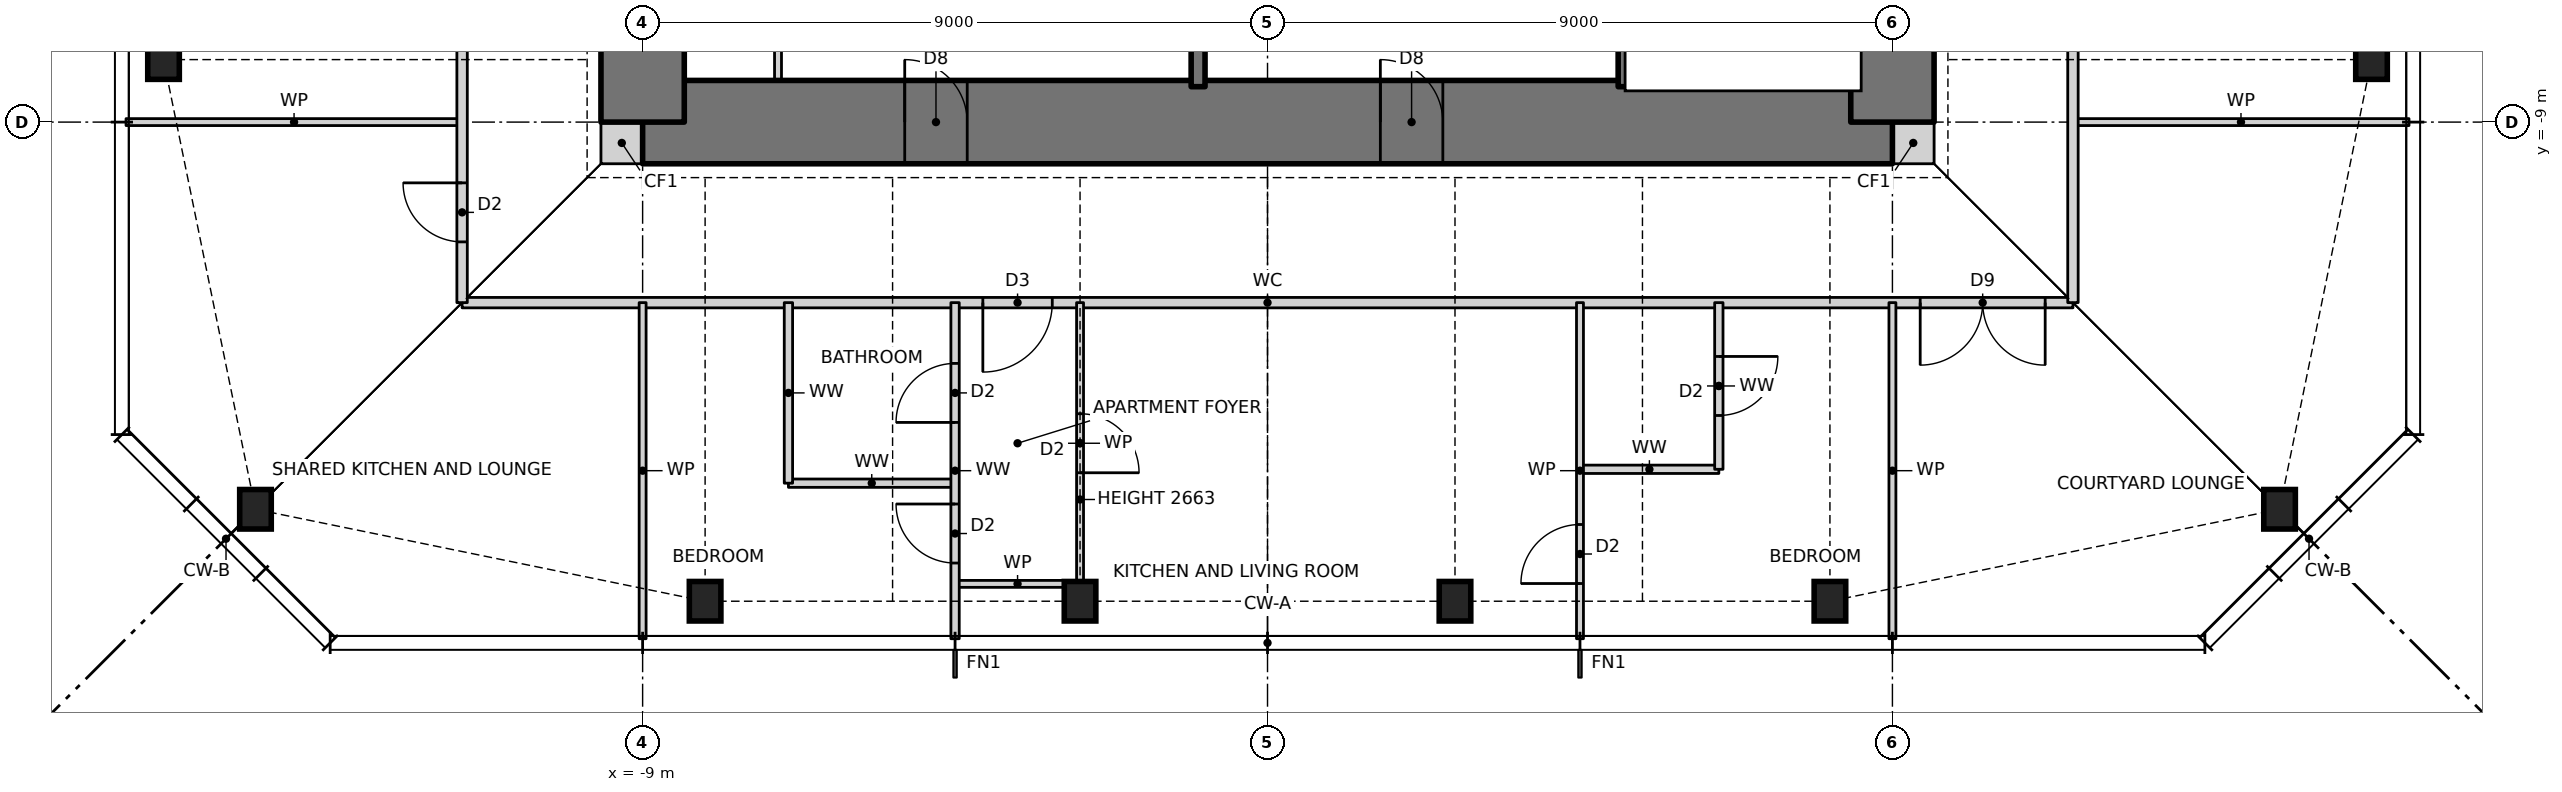
"""IFC4 building model, lengths in metres.
Left out: names, types, materials, properties, quantities, classifications, styles, units other than length and angle.
Written with IfcOpenShell. Run it as: python <this file> out.ifc"""

import sys

from ifc_helpers import new_model, si_unit, direction, frame, frame_2d, origin, origin_2d, place, context, subcontext, project, spatial, rectangle, i_section, extrude, element, fill, save


model = new_model("IFC4")
c1 = context("Model", 3, precision=1e-05, world=origin(), true_north=direction((0.0, 1.0)))
c2 = subcontext(c1, "Body", "Model", "MODEL_VIEW")
j1 = project(units=[si_unit("LENGTHUNIT", "METRE"), si_unit("PLANEANGLEUNIT", "RADIAN")], contexts=[c1])
p1 = place(None, origin())
s1 = spatial("IfcSite", under=j1, at=p1, CompositionType="ELEMENT")
p2 = place(p1, origin())
s2 = spatial("IfcBuilding", under=s1, at=p2, CompositionType="ELEMENT")
p3 = place(p2, frame((0.0, 0.0, 239.5)))
s3 = spatial("IfcBuildingStorey", under=s2, at=p3, CompositionType="ELEMENT", Elevation=239.5)
for number, where, z_axis, x_axis in (
    (1, (-14.576, -14.576, 0.0), (0.0, 0.0, 1.0), (1.0, 0.0, 0.0)),
    (2, (-8.1, -15.9, 0.0), (0.0, 0.0, 1.0), (1.0, 0.0, 0.0)),
    (3, (-2.7, -15.9, 0.0), (0.0, 0.0, 1.0), (1.0, 0.0, 0.0)),
    (4, (2.7, -15.9, 0.0), (0.0, 0.0, 1.0), (1.0, 0.0, 0.0)),
    (5, (8.1, -15.9, 0.0), (0.0, 0.0, 1.0), (1.0, 0.0, 0.0)),
    (6, (14.576, -14.576, 0.0), (0.0, 0.0, 1.0), (1.0, 0.0, 0.0)),
    (7, (15.9, -8.1, 0.0), (0.0, 0.0, 1.0), (1.0, 0.0, 0.0)),
    (8, (-15.9, -8.1, 0.0), (0.0, 0.0, 1.0), (1.0, 0.0, 0.0)),
):
    element("IfcColumn", number, at=place(p3, frame(where, z_axis=z_axis, x_axis=x_axis)), inside=s3, PredefinedType="COLUMN", context=c2, shape_type="SweptSolid", body=[
        extrude(i_section(OverallWidth=0.455, OverallDepth=0.569, WebThickness=0.078, FlangeThickness=0.125, at=origin_2d()), origin(), (0.0, 0.0, 1.0), 3.5),
    ])
for number, where, z_axis, x_axis in (
    (9, (-9.6, -9.3, 0.0), (0.0, 0.0, 1.0), (1.0, 0.0, 0.0)),
    (10, (9.0, -9.3, 0.0), (0.0, 0.0, 1.0), (1.0, 0.0, 0.0)),
):
    element("IfcWall", number, at=place(p3, frame(where, z_axis=z_axis, x_axis=x_axis)), inside=s3, PredefinedType="SOLIDWALL", context=c2, shape_type="SweptSolid", body=[
        extrude(rectangle(XDim=0.6, YDim=0.6, at=frame_2d((0.3, 0.0))), origin(), (0.0, 0.0, 1.0), 3.5),
    ])
p4 = place(p3, frame((-9.0, -9.0, 0.0), z_axis=(0.0, 0.0, 1.0), x_axis=(1.0, 0.0, 0.0)))
e11 = element("IfcWall", 11, at=p4, inside=s3, PredefinedType="SHEAR", context=c2, shape_type="SweptSolid", body=[
    extrude(rectangle(XDim=18.0, YDim=1.2, at=frame_2d((9.0, 0.0))), origin(), (0.0, 0.0, 1.0), 3.5),
])
p5 = place(p4, frame((3.775, 0.0, 0.0)))
e12 = element("IfcOpeningElement", 12, at=p5, cuts=e11, PredefinedType="OPENING", context=c2, shape_type="SweptSolid", body=[
    extrude(rectangle(XDim=0.9, YDim=2.1, at=frame_2d((0.45, 1.05))), frame((0.0, 0.61, 0.0), z_axis=(0.0, -1.0, 0.0), x_axis=(1.0, 0.0, 0.0)), (0.0, 0.0, 1.0), 1.22),
])
p6 = place(p4, frame((10.625, 0.0, 0.0)))
e13 = element("IfcOpeningElement", 13, at=p6, cuts=e11, PredefinedType="OPENING", context=c2, shape_type="SweptSolid", body=[
    extrude(rectangle(XDim=0.9, YDim=2.1, at=frame_2d((0.45, 1.05))), frame((0.0, 0.61, 0.0), z_axis=(0.0, -1.0, 0.0), x_axis=(1.0, 0.0, 0.0)), (0.0, 0.0, 1.0), 1.22),
])
p7 = place(p3, frame((9.0, -9.0, 0.0), z_axis=(0.0, 0.0, 1.0), x_axis=(0.0, 1.0, 0.0)))
e14 = element("IfcWall", 14, at=p7, inside=s3, PredefinedType="SHEAR", context=c2, shape_type="SweptSolid", body=[
    extrude(rectangle(XDim=18.0, YDim=1.2, at=frame_2d((9.0, 0.0))), origin(), (0.0, 0.0, 1.0), 3.5),
])
p8 = place(p7, frame((8.5, 0.0, 0.0)))
e15 = element("IfcOpeningElement", 15, at=p8, cuts=e14, PredefinedType="OPENING", context=c2, shape_type="SweptSolid", body=[
    extrude(rectangle(XDim=1.0, YDim=2.1, at=frame_2d((0.5, 1.05))), frame((0.0, 0.61, 0.0), z_axis=(0.0, -1.0, 0.0), x_axis=(1.0, 0.0, 0.0)), (0.0, 0.0, 1.0), 1.22),
])
p9 = place(p3, frame((-9.0, 9.0, 0.0), z_axis=(0.0, 0.0, 1.0), x_axis=(0.0, -1.0, 0.0)))
e16 = element("IfcWall", 16, at=p9, inside=s3, PredefinedType="SHEAR", context=c2, shape_type="SweptSolid", body=[
    extrude(rectangle(XDim=18.0, YDim=1.2, at=frame_2d((9.0, 0.0))), origin(), (0.0, 0.0, 1.0), 3.5),
])
p10 = place(p9, frame((8.5, 0.0, 0.0)))
e17 = element("IfcOpeningElement", 17, at=p10, cuts=e16, PredefinedType="OPENING", context=c2, shape_type="SweptSolid", body=[
    extrude(rectangle(XDim=1.0, YDim=2.1, at=frame_2d((0.5, 1.05))), frame((0.0, 0.61, 0.0), z_axis=(0.0, -1.0, 0.0), x_axis=(1.0, 0.0, 0.0)), (0.0, 0.0, 1.0), 1.22),
])
p11 = place(p3, frame((-4.5, -15.65, 0.0), z_axis=(0.0, 0.0, 1.0), x_axis=(1.0, 0.0, 0.0)))
e18 = element("IfcWall", 18, at=p11, inside=s3, PredefinedType="PARTITIONING", context=c2, shape_type="SweptSolid", body=[
    extrude(rectangle(XDim=1.8, YDim=0.1, at=frame_2d((0.9, 0.0))), origin(), (0.0, 0.0, 1.0), 3.27),
])
p12 = place(p3, frame((-6.9, -14.2, 0.0), z_axis=(0.0, 0.0, 1.0), x_axis=(1.0, 0.0, 0.0)))
e19 = element("IfcWall", 19, at=p12, inside=s3, PredefinedType="PARTITIONING", context=c2, shape_type="SweptSolid", body=[
    extrude(rectangle(XDim=2.4, YDim=0.12, at=frame_2d((1.2, 0.0))), origin(), (0.0, 0.0, 1.0), 3.27),
])
p13 = place(p3, frame((4.5, -14.0, 0.0), z_axis=(0.0, 0.0, 1.0), x_axis=(1.0, 0.0, 0.0)))
e20 = element("IfcWall", 20, at=p13, inside=s3, PredefinedType="PARTITIONING", context=c2, shape_type="SweptSolid", body=[
    extrude(rectangle(XDim=2.0, YDim=0.12, at=frame_2d((1.0, 0.0))), origin(), (0.0, 0.0, 1.0), 3.27),
])
p14 = place(p3, frame((-11.6, -11.6, 0.0), z_axis=(0.0, 0.0, 1.0), x_axis=(1.0, 0.0, 0.0)))
e21 = element("IfcWall", 21, at=p14, inside=s3, PredefinedType="PARTITIONING", context=c2, shape_type="SweptSolid", body=[
    extrude(rectangle(XDim=23.2, YDim=0.15, at=frame_2d((11.6, 0.0))), origin(), (0.0, 0.0, 1.0), 3.27),
])
p15 = place(p14, frame((7.5, 0.0, 0.0)))
e22 = element("IfcOpeningElement", 22, at=p15, cuts=e21, PredefinedType="OPENING", context=c2, shape_type="SweptSolid", body=[
    extrude(rectangle(XDim=1.0, YDim=2.1, at=frame_2d((0.5, 1.05))), frame((0.0, 0.085, 0.0), z_axis=(0.0, -1.0, 0.0), x_axis=(1.0, 0.0, 0.0)), (0.0, 0.0, 1.0), 0.17),
])
p16 = place(p14, frame((21.0, 0.0, 0.0)))
e23 = element("IfcOpeningElement", 23, at=p16, cuts=e21, PredefinedType="OPENING", context=c2, shape_type="SweptSolid", body=[
    extrude(rectangle(XDim=1.8, YDim=2.1, at=frame_2d((0.9, 1.05))), frame((0.0, 0.085, 0.0), z_axis=(0.0, -1.0, 0.0), x_axis=(1.0, 0.0, 0.0)), (0.0, 0.0, 1.0), 0.17),
])
for number, where, z_axis, x_axis in (
    (24, (-16.44, -9.0, 0.0), (0.0, 0.0, 1.0), (1.0, 0.0, 0.0)),
    (25, (11.6, -9.0, 0.0), (0.0, 0.0, 1.0), (1.0, 0.0, 0.0)),
):
    element("IfcWall", number, at=place(p3, frame(where, z_axis=z_axis, x_axis=x_axis)), inside=s3, PredefinedType="PARTITIONING", context=c2, shape_type="SweptSolid", body=[
        extrude(rectangle(XDim=4.84, YDim=0.1, at=frame_2d((2.42, 0.0))), origin(), (0.0, 0.0, 1.0), 3.27),
    ])
p17 = place(p3, frame((11.6, -11.6, 0.0), z_axis=(0.0, 0.0, 1.0), x_axis=(0.0, 1.0, 0.0)))
e26 = element("IfcWall", 26, at=p17, inside=s3, PredefinedType="PARTITIONING", context=c2, shape_type="SweptSolid", body=[
    extrude(rectangle(XDim=23.2, YDim=0.15, at=frame_2d((11.6, 0.0))), origin(), (0.0, 0.0, 1.0), 3.27),
])
p18 = place(p17, frame((7.5, 0.0, 0.0)))
e27 = element("IfcOpeningElement", 27, at=p18, cuts=e26, PredefinedType="OPENING", context=c2, shape_type="SweptSolid", body=[
    extrude(rectangle(XDim=1.0, YDim=2.1, at=frame_2d((0.5, 1.05))), frame((0.0, 0.085, 0.0), z_axis=(0.0, -1.0, 0.0), x_axis=(1.0, 0.0, 0.0)), (0.0, 0.0, 1.0), 0.17),
])
p19 = place(p17, frame((21.0, 0.0, 0.0)))
e28 = element("IfcOpeningElement", 28, at=p19, cuts=e26, PredefinedType="OPENING", context=c2, shape_type="SweptSolid", body=[
    extrude(rectangle(XDim=1.8, YDim=2.1, at=frame_2d((0.9, 1.05))), frame((0.0, 0.085, 0.0), z_axis=(0.0, -1.0, 0.0), x_axis=(1.0, 0.0, 0.0)), (0.0, 0.0, 1.0), 0.17),
])
p20 = place(p3, frame((9.0, -16.44, 0.0), z_axis=(0.0, 0.0, 1.0), x_axis=(0.0, 1.0, 0.0)))
e29 = element("IfcWall", 29, at=p20, inside=s3, PredefinedType="PARTITIONING", context=c2, shape_type="SweptSolid", body=[
    extrude(rectangle(XDim=4.84, YDim=0.1, at=frame_2d((2.42, 0.0))), origin(), (0.0, 0.0, 1.0), 3.27),
])
p21 = place(p3, frame((6.5, -14.0, 0.0), z_axis=(0.0, 0.0, 1.0), x_axis=(0.0, 1.0, 0.0)))
e30 = element("IfcWall", 30, at=p21, inside=s3, PredefinedType="PARTITIONING", context=c2, shape_type="SweptSolid", body=[
    extrude(rectangle(XDim=2.4, YDim=0.12, at=frame_2d((1.2, 0.0))), origin(), (0.0, 0.0, 1.0), 3.27),
])
p22 = place(p21, frame((0.775, 0.0, 0.0)))
e31 = element("IfcOpeningElement", 31, at=p22, cuts=e30, PredefinedType="OPENING", context=c2, shape_type="SweptSolid", body=[
    extrude(rectangle(XDim=0.85, YDim=2.1, at=frame_2d((0.425, 1.05))), frame((0.0, 0.07, 0.0), z_axis=(0.0, -1.0, 0.0), x_axis=(1.0, 0.0, 0.0)), (0.0, 0.0, 1.0), 0.14),
])
p23 = place(p3, frame((5.15, -8.49, 0.0), z_axis=(0.0, 0.0, 1.0), x_axis=(0.0, 1.0, 0.0)))
e32 = element("IfcWall", 32, at=p23, inside=s3, PredefinedType="SOLIDWALL", context=c2, shape_type="SweptSolid", body=[
    extrude(rectangle(XDim=13.09, YDim=0.2, at=frame_2d((6.545, 0.0))), origin(), (0.0, 0.0, 1.0), 3.5),
])
p24 = place(p23, frame((7.89, 0.0, 0.0)))
e33 = element("IfcOpeningElement", 33, at=p24, cuts=e32, PredefinedType="OPENING", context=c2, shape_type="SweptSolid", body=[
    extrude(rectangle(XDim=1.2, YDim=2.1, at=frame_2d((0.6, 1.05))), frame((0.0, 0.11, 0.0), z_axis=(0.0, -1.0, 0.0), x_axis=(1.0, 0.0, 0.0)), (0.0, 0.0, 1.0), 0.22),
])
p25 = place(p3, frame((4.5, -16.44, 0.0), z_axis=(0.0, 0.0, 1.0), x_axis=(0.0, 1.0, 0.0)))
e34 = element("IfcWall", 34, at=p25, inside=s3, PredefinedType="PARTITIONING", context=c2, shape_type="SweptSolid", body=[
    extrude(rectangle(XDim=4.84, YDim=0.1, at=frame_2d((2.42, 0.0))), origin(), (0.0, 0.0, 1.0), 3.27),
])
p26 = place(p25, frame((0.795, 0.0, 0.0)))
e35 = element("IfcOpeningElement", 35, at=p26, cuts=e34, PredefinedType="OPENING", context=c2, shape_type="SweptSolid", body=[
    extrude(rectangle(XDim=0.85, YDim=2.1, at=frame_2d((0.425, 1.05))), frame((0.0, 0.06, 0.0), z_axis=(0.0, -1.0, 0.0), x_axis=(1.0, 0.0, 0.0)), (0.0, 0.0, 1.0), 0.12),
])
p27 = place(p3, frame((-1.0, -8.49, 0.0), z_axis=(0.0, 0.0, 1.0), x_axis=(0.0, 1.0, 0.0)))
e36 = element("IfcWall", 36, at=p27, inside=s3, PredefinedType="SOLIDWALL", context=c2, shape_type="SweptSolid", body=[
    extrude(rectangle(XDim=4.09, YDim=0.2, at=frame_2d((2.045, 0.0))), origin(), (0.0, 0.0, 1.0), 3.5),
])
p28 = place(p3, frame((-2.7, -15.65, 0.0), z_axis=(0.0, 0.0, 1.0), x_axis=(0.0, 1.0, 0.0)))
e37 = element("IfcWall", 37, at=p28, inside=s3, PredefinedType="PARTITIONING", context=c2, shape_type="SweptSolid", body=[
    extrude(rectangle(XDim=4.05, YDim=0.1, at=frame_2d((2.025, 0.0))), origin(), (0.0, 0.0, 1.0), 2.663),
])
p29 = place(p28, frame((1.6, 0.0, 0.0)))
e38 = element("IfcOpeningElement", 38, at=p29, cuts=e37, PredefinedType="OPENING", context=c2, shape_type="SweptSolid", body=[
    extrude(rectangle(XDim=0.85, YDim=2.1, at=frame_2d((0.425, 1.05))), frame((0.0, 0.06, 0.0), z_axis=(0.0, -1.0, 0.0), x_axis=(1.0, 0.0, 0.0)), (0.0, 0.0, 1.0), 0.12),
])
p30 = place(p3, frame((-4.5, -16.44, 0.0), z_axis=(0.0, 0.0, 1.0), x_axis=(0.0, 1.0, 0.0)))
e39 = element("IfcWall", 39, at=p30, inside=s3, PredefinedType="PARTITIONING", context=c2, shape_type="SweptSolid", body=[
    extrude(rectangle(XDim=4.84, YDim=0.12, at=frame_2d((2.42, 0.0))), origin(), (0.0, 0.0, 1.0), 3.27),
])
p31 = place(p30, frame((1.09, 0.0, 0.0)))
e40 = element("IfcOpeningElement", 40, at=p31, cuts=e39, PredefinedType="OPENING", context=c2, shape_type="SweptSolid", body=[
    extrude(rectangle(XDim=0.85, YDim=2.1, at=frame_2d((0.425, 1.05))), frame((0.0, 0.07, 0.0), z_axis=(0.0, -1.0, 0.0), x_axis=(1.0, 0.0, 0.0)), (0.0, 0.0, 1.0), 0.14),
])
p32 = place(p30, frame((3.115, 0.0, 0.0)))
e41 = element("IfcOpeningElement", 41, at=p32, cuts=e39, PredefinedType="OPENING", context=c2, shape_type="SweptSolid", body=[
    extrude(rectangle(XDim=0.85, YDim=2.1, at=frame_2d((0.425, 1.05))), frame((0.0, 0.07, 0.0), z_axis=(0.0, -1.0, 0.0), x_axis=(1.0, 0.0, 0.0)), (0.0, 0.0, 1.0), 0.14),
])
p33 = place(p3, frame((-6.9, -14.2, 0.0), z_axis=(0.0, 0.0, 1.0), x_axis=(0.0, 1.0, 0.0)))
e42 = element("IfcWall", 42, at=p33, inside=s3, PredefinedType="PARTITIONING", context=c2, shape_type="SweptSolid", body=[
    extrude(rectangle(XDim=2.6, YDim=0.12, at=frame_2d((1.3, 0.0))), origin(), (0.0, 0.0, 1.0), 3.27),
])
p34 = place(p3, frame((-7.05, -8.49, 0.0), z_axis=(0.0, 0.0, 1.0), x_axis=(0.0, 1.0, 0.0)))
e43 = element("IfcWall", 43, at=p34, inside=s3, PredefinedType="PARTITIONING", context=c2, shape_type="SweptSolid", body=[
    extrude(rectangle(XDim=4.09, YDim=0.1, at=frame_2d((2.045, 0.0))), origin(), (0.0, 0.0, 1.0), 3.3),
])
p35 = place(p34, frame((1.595, 0.0, 0.0)))
e44 = element("IfcOpeningElement", 44, at=p35, cuts=e43, PredefinedType="OPENING", context=c2, shape_type="SweptSolid", body=[
    extrude(rectangle(XDim=0.9, YDim=2.1, at=frame_2d((0.45, 1.05))), frame((0.0, 0.06, 0.0), z_axis=(0.0, -1.0, 0.0), x_axis=(1.0, 0.0, 0.0)), (0.0, 0.0, 1.0), 0.12),
])
p36 = place(p3, frame((-9.0, -16.44, 0.0), z_axis=(0.0, 0.0, 1.0), x_axis=(0.0, 1.0, 0.0)))
e45 = element("IfcWall", 45, at=p36, inside=s3, PredefinedType="PARTITIONING", context=c2, shape_type="SweptSolid", body=[
    extrude(rectangle(XDim=4.84, YDim=0.1, at=frame_2d((2.42, 0.0))), origin(), (0.0, 0.0, 1.0), 3.27),
])
p37 = place(p3, frame((-11.6, -11.6, 0.0), z_axis=(0.0, 0.0, 1.0), x_axis=(0.0, 1.0, 0.0)))
e46 = element("IfcWall", 46, at=p37, inside=s3, PredefinedType="PARTITIONING", context=c2, shape_type="SweptSolid", body=[
    extrude(rectangle(XDim=23.2, YDim=0.15, at=frame_2d((11.6, 0.0))), origin(), (0.0, 0.0, 1.0), 3.27),
])
p38 = place(p37, frame((14.7, 0.0, 0.0)))
e47 = element("IfcOpeningElement", 47, at=p38, cuts=e46, PredefinedType="OPENING", context=c2, shape_type="SweptSolid", body=[
    extrude(rectangle(XDim=1.0, YDim=2.1, at=frame_2d((0.5, 1.05))), frame((0.0, 0.085, 0.0), z_axis=(0.0, -1.0, 0.0), x_axis=(1.0, 0.0, 0.0)), (0.0, 0.0, 1.0), 0.17),
])
p39 = place(p37, frame((0.875, 0.0, 0.0)))
e48 = element("IfcOpeningElement", 48, at=p39, cuts=e46, PredefinedType="OPENING", context=c2, shape_type="SweptSolid", body=[
    extrude(rectangle(XDim=0.85, YDim=2.1, at=frame_2d((0.425, 1.05))), frame((0.0, 0.085, 0.0), z_axis=(0.0, -1.0, 0.0), x_axis=(1.0, 0.0, 0.0)), (0.0, 0.0, 1.0), 0.17),
])
p40 = place(p15, frame((1.0, 0.0, 0.0), z_axis=(0.0, 0.0, 1.0), x_axis=(-1.0, 0.0, 0.0)))
e49 = element("IfcDoor", 49, at=p40, inside=s3, OperationType="SINGLE_SWING_RIGHT", PredefinedType="DOOR", context=c2, shape_type="SweptSolid", body=[
    extrude(rectangle(XDim=1.0, YDim=2.1, at=frame_2d((0.5, 1.05))), frame((0.0, 0.025, 0.0), z_axis=(0.0, -1.0, 0.0), x_axis=(1.0, 0.0, 0.0)), (0.0, 0.0, 1.0), 0.05),
])
fill(e22, e49)
p41 = place(p29, frame((0.85, 0.0, 0.0), z_axis=(0.0, 0.0, 1.0), x_axis=(-1.0, 0.0, 0.0)))
e50 = element("IfcDoor", 50, at=p41, inside=s3, OperationType="SINGLE_SWING_RIGHT", PredefinedType="DOOR", context=c2, shape_type="SweptSolid", body=[
    extrude(rectangle(XDim=0.85, YDim=2.1, at=frame_2d((0.425, 1.05))), frame((0.0, 0.025, 0.0), z_axis=(0.0, -1.0, 0.0), x_axis=(1.0, 0.0, 0.0)), (0.0, 0.0, 1.0), 0.05),
])
fill(e38, e50)
p42 = place(p31, origin())
e51 = element("IfcDoor", 51, at=p42, inside=s3, OperationType="SINGLE_SWING_RIGHT", PredefinedType="DOOR", context=c2, shape_type="SweptSolid", body=[
    extrude(rectangle(XDim=0.85, YDim=2.1, at=frame_2d((0.425, 1.05))), frame((0.0, 0.025, 0.0), z_axis=(0.0, -1.0, 0.0), x_axis=(1.0, 0.0, 0.0)), (0.0, 0.0, 1.0), 0.05),
])
fill(e40, e51)
p43 = place(p32, origin())
e52 = element("IfcDoor", 52, at=p43, inside=s3, OperationType="SINGLE_SWING_LEFT", PredefinedType="DOOR", context=c2, shape_type="SweptSolid", body=[
    extrude(rectangle(XDim=0.85, YDim=2.1, at=frame_2d((0.425, 1.05))), frame((0.0, 0.025, 0.0), z_axis=(0.0, -1.0, 0.0), x_axis=(1.0, 0.0, 0.0)), (0.0, 0.0, 1.0), 0.05),
])
fill(e41, e52)
p44 = place(p26, origin())
e53 = element("IfcDoor", 53, at=p44, inside=s3, OperationType="SINGLE_SWING_LEFT", PredefinedType="DOOR", context=c2, shape_type="SweptSolid", body=[
    extrude(rectangle(XDim=0.85, YDim=2.1, at=frame_2d((0.425, 1.05))), frame((0.0, 0.025, 0.0), z_axis=(0.0, -1.0, 0.0), x_axis=(1.0, 0.0, 0.0)), (0.0, 0.0, 1.0), 0.05),
])
fill(e35, e53)
p45 = place(p22, frame((0.85, 0.0, 0.0), z_axis=(0.0, 0.0, 1.0), x_axis=(-1.0, 0.0, 0.0)))
e54 = element("IfcDoor", 54, at=p45, inside=s3, OperationType="SINGLE_SWING_LEFT", PredefinedType="DOOR", context=c2, shape_type="SweptSolid", body=[
    extrude(rectangle(XDim=0.85, YDim=2.1, at=frame_2d((0.425, 1.05))), frame((0.0, 0.025, 0.0), z_axis=(0.0, -1.0, 0.0), x_axis=(1.0, 0.0, 0.0)), (0.0, 0.0, 1.0), 0.05),
])
fill(e31, e54)
p46 = place(p39, origin())
e55 = element("IfcDoor", 55, at=p46, inside=s3, OperationType="SINGLE_SWING_RIGHT", PredefinedType="DOOR", context=c2, shape_type="SweptSolid", body=[
    extrude(rectangle(XDim=0.85, YDim=2.1, at=frame_2d((0.425, 1.05))), frame((0.0, 0.025, 0.0), z_axis=(0.0, -1.0, 0.0), x_axis=(1.0, 0.0, 0.0)), (0.0, 0.0, 1.0), 0.05),
])
fill(e48, e55)
p47 = place(p16, frame((1.8, 0.0, 0.0), z_axis=(0.0, 0.0, 1.0), x_axis=(-1.0, 0.0, 0.0)))
e56 = element("IfcDoor", 56, at=p47, inside=s3, OperationType="DOUBLE_DOOR_SINGLE_SWING", PredefinedType="DOOR", context=c2, shape_type="SweptSolid", body=[
    extrude(rectangle(XDim=1.8, YDim=2.1, at=frame_2d((0.9, 1.05))), frame((0.0, 0.025, 0.0), z_axis=(0.0, -1.0, 0.0), x_axis=(1.0, 0.0, 0.0)), (0.0, 0.0, 1.0), 0.05),
])
fill(e23, e56)
p48 = place(p5, origin())
e57 = element("IfcDoor", 57, at=p48, inside=s3, OperationType="SINGLE_SWING_LEFT", PredefinedType="DOOR", context=c2, shape_type="SweptSolid", body=[
    extrude(rectangle(XDim=0.9, YDim=2.1, at=frame_2d((0.45, 1.05))), frame((0.0, 0.025, 0.0), z_axis=(0.0, -1.0, 0.0), x_axis=(1.0, 0.0, 0.0)), (0.0, 0.0, 1.0), 0.05),
])
fill(e12, e57)
p49 = place(p6, origin())
e58 = element("IfcDoor", 58, at=p49, inside=s3, OperationType="SINGLE_SWING_LEFT", PredefinedType="DOOR", context=c2, shape_type="SweptSolid", body=[
    extrude(rectangle(XDim=0.9, YDim=2.1, at=frame_2d((0.45, 1.05))), frame((0.0, 0.025, 0.0), z_axis=(0.0, -1.0, 0.0), x_axis=(1.0, 0.0, 0.0)), (0.0, 0.0, 1.0), 0.05),
])
fill(e13, e58)
save(model, sys.argv[1])
